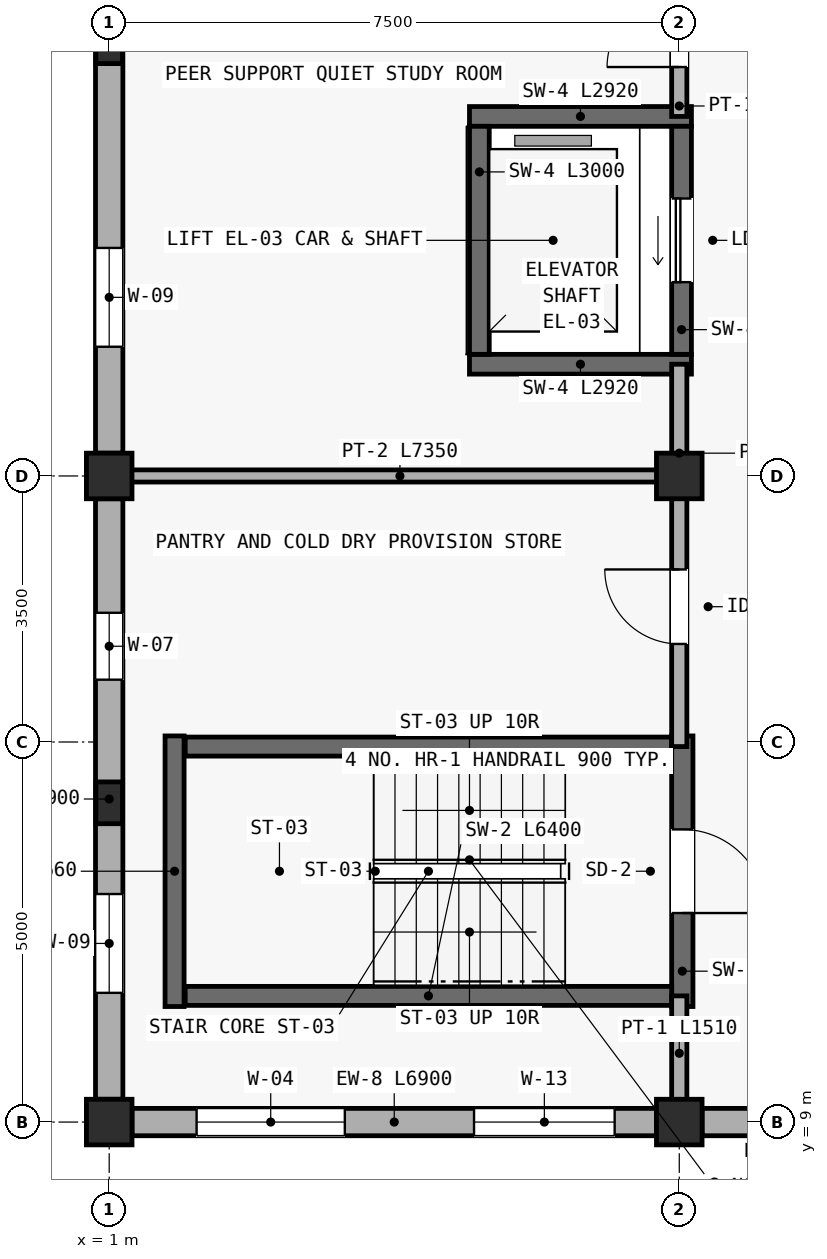
"""IFC4 building model, lengths in metres.
Left out: names, types, materials, properties, quantities, classifications, styles, units other than length and angle.
Written with IfcOpenShell. Run it as: python <this file> out.ifc"""

import sys

from ifc_helpers import new_model, si_unit, direction, frame, frame_2d, origin, origin_2d, place, context, subcontext, project, spatial, rectangle, extrude, element, fill, save


model = new_model("IFC4")
c1 = context("Model", 3, precision=1e-05, world=origin(), true_north=direction((0.0, 1.0)))
c2 = subcontext(c1, "Body", "Model", "MODEL_VIEW")
j1 = project(units=[si_unit("LENGTHUNIT", "METRE"), si_unit("PLANEANGLEUNIT", "RADIAN")], contexts=[c1])
p1 = place(None, origin())
s1 = spatial("IfcSite", under=j1, at=p1, CompositionType="ELEMENT")
p2 = place(p1, origin())
s2 = spatial("IfcBuilding", under=s1, at=p2, CompositionType="ELEMENT")
p3 = place(p2, frame((0.0, 0.0, 5.85)))
s3 = spatial("IfcBuildingStorey", under=s2, at=p3, CompositionType="ELEMENT", Elevation=5.85)
for number, where, z_axis, x_axis in (
    (1, (1.0, 9.0, 0.0), (0.0, 0.0, 1.0), (1.0, 0.0, 0.0)),
    (2, (1.0, 17.5, 0.0), (0.0, 0.0, 1.0), (1.0, 0.0, 0.0)),
    (3, (8.5, 9.0, 0.0), (0.0, 0.0, 1.0), (1.0, 0.0, 0.0)),
    (4, (8.5, 17.5, 0.0), (0.0, 0.0, 1.0), (1.0, 0.0, 0.0)),
):
    element("IfcColumn", number, at=place(p3, frame(where, z_axis=z_axis, x_axis=x_axis)), inside=s3, PredefinedType="COLUMN", context=c2, shape_type="SweptSolid", body=[
        extrude(rectangle(XDim=0.6, YDim=0.6, at=origin_2d()), origin(), (0.0, 0.0, 1.0), 3.45),
    ])
for number, where, z_axis, x_axis in (
    (5, (1.0, 13.2, 0.0), (0.0, 0.0, 1.0), (1.0, 0.0, 0.0)),
    (6, (1.0, 23.2, 0.0), (0.0, 0.0, 1.0), (1.0, 0.0, 0.0)),
):
    element("IfcColumn", number, at=place(p3, frame(where, z_axis=z_axis, x_axis=x_axis)), inside=s3, PredefinedType="PILASTER", context=c2, shape_type="SweptSolid", body=[
        extrude(rectangle(XDim=0.35, YDim=0.55, at=origin_2d()), origin(), (0.0, 0.0, 1.0), 3.45),
    ])
p4 = place(p3, frame((1.3, 9.0, 0.0), z_axis=(0.0, 0.0, 1.0), x_axis=(1.0, 0.0, 0.0)))
e7 = element("IfcWall", 7, at=p4, inside=s3, PredefinedType="STANDARD", context=c2, shape_type="SweptSolid", body=[
    extrude(rectangle(XDim=6.9, YDim=0.36, at=frame_2d((3.45, 0.0))), origin(), (0.0, 0.0, 1.0), 2.69),
])
p5 = place(p4, frame((0.85, 0.0, 0.75)))
e8 = element("IfcOpeningElement", 8, at=p5, cuts=e7, PredefinedType="OPENING", context=c2, shape_type="SweptSolid", body=[
    extrude(rectangle(XDim=1.95, YDim=1.35, at=frame_2d((0.975, 0.675))), frame((0.0, 0.19, 0.0), z_axis=(0.0, -1.0, 0.0), x_axis=(1.0, 0.0, 0.0)), (0.0, 0.0, 1.0), 0.38),
])
p6 = place(p4, frame((4.5, 0.0, 0.75)))
e9 = element("IfcOpeningElement", 9, at=p6, cuts=e7, PredefinedType="OPENING", context=c2, shape_type="SweptSolid", body=[
    extrude(rectangle(XDim=1.85, YDim=1.3, at=frame_2d((0.925, 0.65))), frame((0.0, 0.19, 0.0), z_axis=(0.0, -1.0, 0.0), x_axis=(1.0, 0.0, 0.0)), (0.0, 0.0, 1.0), 0.38),
])
p7 = place(p3, frame((8.8, 9.0, 0.0), z_axis=(0.0, 0.0, 1.0), x_axis=(1.0, 0.0, 0.0)))
e10 = element("IfcWall", 10, at=p7, inside=s3, PredefinedType="STANDARD", context=c2, shape_type="SweptSolid", body=[
    extrude(rectangle(XDim=3.4, YDim=0.36, at=frame_2d((1.7, 0.0))), origin(), (0.0, 0.0, 1.0), 2.69),
])
p8 = place(p7, frame((0.85, 0.0, 0.75)))
e11 = element("IfcOpeningElement", 11, at=p8, cuts=e10, PredefinedType="OPENING", context=c2, shape_type="SweptSolid", body=[
    extrude(rectangle(XDim=1.95, YDim=1.35, at=frame_2d((0.975, 0.675))), frame((0.0, 0.19, 0.0), z_axis=(0.0, -1.0, 0.0), x_axis=(1.0, 0.0, 0.0)), (0.0, 0.0, 1.0), 0.38),
])
p9 = place(p3, frame((1.0, 17.2, 0.0), z_axis=(0.0, 0.0, 1.0), x_axis=(0.0, -1.0, 0.0)))
e12 = element("IfcWall", 12, at=p9, inside=s3, PredefinedType="STANDARD", context=c2, shape_type="SweptSolid", body=[
    extrude(rectangle(XDim=7.9, YDim=0.36, at=frame_2d((3.95, 0.0))), origin(), (0.0, 0.0, 1.0), 2.75),
])
p10 = place(p9, frame((1.5, 0.0, 0.7)))
e13 = element("IfcOpeningElement", 13, at=p10, cuts=e12, PredefinedType="OPENING", context=c2, shape_type="SweptSolid", body=[
    extrude(rectangle(XDim=0.88, YDim=1.5, at=frame_2d((0.44, 0.75))), frame((0.0, 0.19, 0.0), z_axis=(0.0, -1.0, 0.0), x_axis=(1.0, 0.0, 0.0)), (0.0, 0.0, 1.0), 0.38),
])
p11 = place(p9, frame((5.2, 0.0, 0.7)))
e14 = element("IfcOpeningElement", 14, at=p11, cuts=e12, PredefinedType="OPENING", context=c2, shape_type="SweptSolid", body=[
    extrude(rectangle(XDim=1.3, YDim=1.4, at=frame_2d((0.65, 0.7))), frame((0.0, 0.19, 0.0), z_axis=(0.0, -1.0, 0.0), x_axis=(1.0, 0.0, 0.0)), (0.0, 0.0, 1.0), 0.38),
])
p12 = place(p3, frame((1.0, 28.7, 0.0), z_axis=(0.0, 0.0, 1.0), x_axis=(0.0, -1.0, 0.0)))
e15 = element("IfcWall", 15, at=p12, inside=s3, PredefinedType="STANDARD", context=c2, shape_type="SweptSolid", body=[
    extrude(rectangle(XDim=10.9, YDim=0.36, at=frame_2d((5.45, 0.0))), origin(), (0.0, 0.0, 1.0), 2.75),
])
p13 = place(p12, frame((1.5, 0.0, 0.7)))
e16 = element("IfcOpeningElement", 16, at=p13, cuts=e15, PredefinedType="OPENING", context=c2, shape_type="SweptSolid", body=[
    extrude(rectangle(XDim=0.88, YDim=1.5, at=frame_2d((0.44, 0.75))), frame((0.0, 0.19, 0.0), z_axis=(0.0, -1.0, 0.0), x_axis=(1.0, 0.0, 0.0)), (0.0, 0.0, 1.0), 0.38),
])
p14 = place(p12, frame((8.2, 0.0, 0.7)))
e17 = element("IfcOpeningElement", 17, at=p14, cuts=e15, PredefinedType="OPENING", context=c2, shape_type="SweptSolid", body=[
    extrude(rectangle(XDim=1.3, YDim=1.4, at=frame_2d((0.65, 0.7))), frame((0.0, 0.19, 0.0), z_axis=(0.0, -1.0, 0.0), x_axis=(1.0, 0.0, 0.0)), (0.0, 0.0, 1.0), 0.38),
])
p15 = place(p3, frame((8.54, 14.08, 0.0), z_axis=(0.0, 0.0, 1.0), x_axis=(0.0, -1.0, 0.0)))
e18 = element("IfcWall", 18, at=p15, inside=s3, PredefinedType="SHEAR", context=c2, shape_type="SweptSolid", body=[
    extrude(rectangle(XDim=3.56, YDim=0.28, at=frame_2d((1.78, 0.0))), origin(), (0.0, 0.0, 1.0), 3.2),
])
p16 = place(p15, frame((1.23, 0.0, 0.0)))
e19 = element("IfcOpeningElement", 19, at=p16, cuts=e18, PredefinedType="OPENING", context=c2, shape_type="SweptSolid", body=[
    extrude(rectangle(XDim=1.1, YDim=2.15, at=frame_2d((0.55, 1.075))), frame((0.0, 0.15, 0.0), z_axis=(0.0, -1.0, 0.0), x_axis=(1.0, 0.0, 0.0)), (0.0, 0.0, 1.0), 0.3),
])
p17 = place(p3, frame((1.86, 10.52, 0.0), z_axis=(0.0, 0.0, 1.0), x_axis=(0.0, 1.0, 0.0)))
e20 = element("IfcWall", 20, at=p17, inside=s3, PredefinedType="SHEAR", context=c2, shape_type="SweptSolid", body=[
    extrude(rectangle(XDim=3.56, YDim=0.25, at=frame_2d((1.78, 0.0))), origin(), (0.0, 0.0, 1.0), 3.2),
])
for number, where, z_axis, x_axis in (
    (21, (8.4, 13.94, 0.0), (0.0, 0.0, 1.0), (-1.0, 0.0, 0.0)),
    (22, (2.0, 10.66, 0.0), (0.0, 0.0, 1.0), (1.0, 0.0, 0.0)),
):
    element("IfcWall", number, at=place(p3, frame(where, z_axis=z_axis, x_axis=x_axis)), inside=s3, PredefinedType="SHEAR", context=c2, shape_type="SweptSolid", body=[
        extrude(rectangle(XDim=6.4, YDim=0.25, at=frame_2d((3.2, 0.0))), origin(), (0.0, 0.0, 1.0), 3.2),
    ])
for number, where, z_axis, x_axis in (
    (23, (5.74, 18.97, 0.0), (0.0, 0.0, 1.0), (1.0, 0.0, 0.0)),
    (24, (8.66, 22.23, 0.0), (0.0, 0.0, 1.0), (-1.0, 0.0, 0.0)),
):
    element("IfcWall", number, at=place(p3, frame(where, z_axis=z_axis, x_axis=x_axis)), inside=s3, PredefinedType="SHEAR", context=c2, shape_type="SweptSolid", body=[
        extrude(rectangle(XDim=2.92, YDim=0.26, at=frame_2d((1.46, 0.0))), origin(), (0.0, 0.0, 1.0), 3.2),
    ])
p18 = place(p3, frame((5.87, 22.1, 0.0), z_axis=(0.0, 0.0, 1.0), x_axis=(0.0, -1.0, 0.0)))
e25 = element("IfcWall", 25, at=p18, inside=s3, PredefinedType="SHEAR", context=c2, shape_type="SweptSolid", body=[
    extrude(rectangle(XDim=3.0, YDim=0.26, at=frame_2d((1.5, 0.0))), origin(), (0.0, 0.0, 1.0), 3.2),
])
p19 = place(p3, frame((8.53, 19.1, 0.0), z_axis=(0.0, 0.0, 1.0), x_axis=(0.0, 1.0, 0.0)))
e26 = element("IfcWall", 26, at=p19, inside=s3, PredefinedType="SHEAR", context=c2, shape_type="SweptSolid", body=[
    extrude(rectangle(XDim=3.0, YDim=0.26, at=frame_2d((1.5, 0.0))), origin(), (0.0, 0.0, 1.0), 3.2),
])
p20 = place(p19, frame((0.95, 0.0, 0.0)))
e27 = element("IfcOpeningElement", 27, at=p20, cuts=e26, PredefinedType="OPENING", context=c2, shape_type="SweptSolid", body=[
    extrude(rectangle(XDim=1.1, YDim=2.15, at=frame_2d((0.55, 1.075))), frame((0.0, 0.14, 0.0), z_axis=(0.0, -1.0, 0.0), x_axis=(1.0, 0.0, 0.0)), (0.0, 0.0, 1.0), 0.28),
])
p21 = place(p3, frame((8.5, 9.15, 0.0), z_axis=(0.0, 0.0, 1.0), x_axis=(0.0, 1.0, 0.0)))
e28 = element("IfcWall", 28, at=p21, inside=s3, PredefinedType="PARTITIONING", context=c2, shape_type="SweptSolid", body=[
    extrude(rectangle(XDim=1.51, YDim=0.2, at=frame_2d((0.755, 0.0))), origin(), (0.0, 0.0, 1.0), 2.7),
])
p22 = place(p3, frame((8.5, 13.94, 0.0), z_axis=(0.0, 0.0, 1.0), x_axis=(0.0, 1.0, 0.0)))
e29 = element("IfcWall", 29, at=p22, inside=s3, PredefinedType="PARTITIONING", context=c2, shape_type="SweptSolid", body=[
    extrude(rectangle(XDim=5.03, YDim=0.2, at=frame_2d((2.515, 0.0))), origin(), (0.0, 0.0, 1.0), 2.7),
])
p23 = place(p22, frame((1.35, 0.0, 0.0)))
e30 = element("IfcOpeningElement", 30, at=p23, cuts=e29, PredefinedType="OPENING", context=c2, shape_type="SweptSolid", body=[
    extrude(rectangle(XDim=0.98, YDim=2.12, at=frame_2d((0.49, 1.06))), frame((0.0, 0.11, 0.0), z_axis=(0.0, -1.0, 0.0), x_axis=(1.0, 0.0, 0.0)), (0.0, 0.0, 1.0), 0.22),
])
p24 = place(p3, frame((8.5, 22.23, 0.0), z_axis=(0.0, 0.0, 1.0), x_axis=(0.0, 1.0, 0.0)))
e31 = element("IfcWall", 31, at=p24, inside=s3, PredefinedType="PARTITIONING", context=c2, shape_type="SweptSolid", body=[
    extrude(rectangle(XDim=2.23, YDim=0.2, at=frame_2d((1.115, 0.0))), origin(), (0.0, 0.0, 1.0), 2.7),
])
p25 = place(p24, frame((0.65, 0.0, 0.0)))
e32 = element("IfcOpeningElement", 32, at=p25, cuts=e31, PredefinedType="OPENING", context=c2, shape_type="SweptSolid", body=[
    extrude(rectangle(XDim=0.95, YDim=2.1, at=frame_2d((0.475, 1.05))), frame((0.0, 0.11, 0.0), z_axis=(0.0, -1.0, 0.0), x_axis=(1.0, 0.0, 0.0)), (0.0, 0.0, 1.0), 0.22),
])
p26 = place(p3, frame((1.15, 17.5, 0.0), z_axis=(0.0, 0.0, 1.0), x_axis=(1.0, 0.0, 0.0)))
e33 = element("IfcWall", 33, at=p26, inside=s3, PredefinedType="PARTITIONING", context=c2, shape_type="SweptSolid", body=[
    extrude(rectangle(XDim=7.35, YDim=0.16, at=frame_2d((3.675, 0.0))), origin(), (0.0, 0.0, 1.0), 2.7),
])
p27 = place(p5, origin())
e34 = element("IfcWindow", 34, at=p27, inside=s3, PartitioningType="DOUBLE_PANEL_HORIZONTAL", PredefinedType="WINDOW", context=c2, shape_type="SweptSolid", body=[
    extrude(rectangle(XDim=1.95, YDim=1.35, at=frame_2d((0.975, 0.675))), frame((0.0, 0.03, 0.0), z_axis=(0.0, -1.0, 0.0), x_axis=(1.0, 0.0, 0.0)), (0.0, 0.0, 1.0), 0.06),
])
fill(e8, e34)
p28 = place(p6, origin())
e35 = element("IfcWindow", 35, at=p28, inside=s3, PartitioningType="DOUBLE_PANEL_HORIZONTAL", PredefinedType="WINDOW", context=c2, shape_type="SweptSolid", body=[
    extrude(rectangle(XDim=1.85, YDim=1.3, at=frame_2d((0.925, 0.65))), frame((0.0, 0.03, 0.0), z_axis=(0.0, -1.0, 0.0), x_axis=(1.0, 0.0, 0.0)), (0.0, 0.0, 1.0), 0.06),
])
fill(e9, e35)
p29 = place(p10, origin())
e36 = element("IfcWindow", 36, at=p29, inside=s3, PartitioningType="SINGLE_PANEL", PredefinedType="WINDOW", context=c2, shape_type="SweptSolid", body=[
    extrude(rectangle(XDim=0.88, YDim=1.5, at=frame_2d((0.44, 0.75))), frame((0.0, 0.03, 0.0), z_axis=(0.0, -1.0, 0.0), x_axis=(1.0, 0.0, 0.0)), (0.0, 0.0, 1.0), 0.06),
])
fill(e13, e36)
p30 = place(p11, origin())
e37 = element("IfcWindow", 37, at=p30, inside=s3, PartitioningType="SINGLE_PANEL", PredefinedType="WINDOW", context=c2, shape_type="SweptSolid", body=[
    extrude(rectangle(XDim=1.3, YDim=1.4, at=frame_2d((0.65, 0.7))), frame((0.0, 0.03, 0.0), z_axis=(0.0, -1.0, 0.0), x_axis=(1.0, 0.0, 0.0)), (0.0, 0.0, 1.0), 0.06),
])
fill(e14, e37)
p31 = place(p14, origin())
e38 = element("IfcWindow", 38, at=p31, inside=s3, PartitioningType="SINGLE_PANEL", PredefinedType="WINDOW", context=c2, shape_type="SweptSolid", body=[
    extrude(rectangle(XDim=1.3, YDim=1.4, at=frame_2d((0.65, 0.7))), frame((0.0, 0.03, 0.0), z_axis=(0.0, -1.0, 0.0), x_axis=(1.0, 0.0, 0.0)), (0.0, 0.0, 1.0), 0.06),
])
fill(e17, e38)
p32 = place(p16, origin())
e39 = element("IfcDoor", 39, at=p32, inside=s3, OperationType="SINGLE_SWING_RIGHT", PredefinedType="DOOR", context=c2, shape_type="SweptSolid", body=[
    extrude(rectangle(XDim=1.1, YDim=2.15, at=frame_2d((0.55, 1.075))), frame((0.0, 0.025, 0.0), z_axis=(0.0, -1.0, 0.0), x_axis=(1.0, 0.0, 0.0)), (0.0, 0.0, 1.0), 0.05),
])
fill(e19, e39)
p33 = place(p20, origin())
e40 = element("IfcDoor", 40, at=p33, inside=s3, OperationType="SLIDING_TO_LEFT", PredefinedType="DOOR", context=c2, shape_type="SweptSolid", body=[
    extrude(rectangle(XDim=1.1, YDim=2.15, at=frame_2d((0.55, 1.075))), frame((0.0, 0.025, 0.0), z_axis=(0.0, -1.0, 0.0), x_axis=(1.0, 0.0, 0.0)), (0.0, 0.0, 1.0), 0.05),
])
fill(e27, e40)
p34 = place(p23, origin())
e41 = element("IfcDoor", 41, at=p34, inside=s3, OperationType="SINGLE_SWING_RIGHT", PredefinedType="DOOR", context=c2, shape_type="SweptSolid", body=[
    extrude(rectangle(XDim=0.98, YDim=2.12, at=frame_2d((0.49, 1.06))), frame((0.0, 0.025, 0.0), z_axis=(0.0, -1.0, 0.0), x_axis=(1.0, 0.0, 0.0)), (0.0, 0.0, 1.0), 0.05),
])
fill(e30, e41)
p35 = place(p25, origin())
e42 = element("IfcDoor", 42, at=p35, inside=s3, OperationType="SINGLE_SWING_LEFT", PredefinedType="DOOR", context=c2, shape_type="SweptSolid", body=[
    extrude(rectangle(XDim=0.95, YDim=2.1, at=frame_2d((0.475, 1.05))), frame((0.0, 0.025, 0.0), z_axis=(0.0, -1.0, 0.0), x_axis=(1.0, 0.0, 0.0)), (0.0, 0.0, 1.0), 0.05),
])
fill(e32, e42)
save(model, sys.argv[1])
